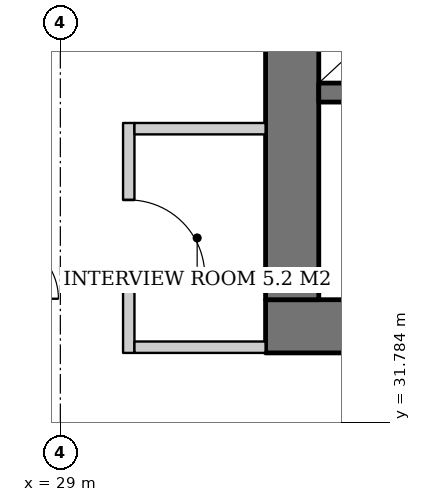
"""IFC4 building model, lengths in metres.
Left out: names, types, materials, properties, quantities, classifications, styles, units other than length and angle.
Written with IfcOpenShell. Run it as: python <this file> out.ifc"""

import sys

from ifc_helpers import new_model, si_unit, direction, frame, frame_2d, origin, place, context, subcontext, project, spatial, rectangle, extrude, element, fill, save


model = new_model("IFC4")
c1 = context("Model", 3, precision=1e-05, world=origin(), true_north=direction((0.0, 1.0)))
c2 = subcontext(c1, "Body", "Model", "MODEL_VIEW")
j1 = project(units=[si_unit("LENGTHUNIT", "METRE"), si_unit("PLANEANGLEUNIT", "RADIAN")], contexts=[c1])
p1 = place(None, origin())
s1 = spatial("IfcSite", under=j1, at=p1, CompositionType="ELEMENT")
p2 = place(p1, origin())
s2 = spatial("IfcBuilding", under=s1, at=p2, CompositionType="ELEMENT")
p3 = place(p2, frame((0.0, 0.0, 93.2)))
s3 = spatial("IfcBuildingStorey", under=s2, at=p3, CompositionType="ELEMENT", Elevation=93.2)
p4 = place(p3, frame((31.7, 33.05, 0.0), z_axis=(0.0, 0.0, 1.0), x_axis=(1.0, 0.0, 0.0)))
e1 = element("IfcWall", 1, at=p4, inside=s3, PredefinedType="SHEAR", context=c2, shape_type="SweptSolid", body=[
    extrude(rectangle(XDim=26.6, YDim=0.7, at=frame_2d((13.3, 0.0))), origin(), (0.0, 0.0, 1.0), 3.8),
])
p5 = place(p4, frame((7.3, 0.0, 0.0)))
e2 = element("IfcOpeningElement", 2, at=p5, cuts=e1, PredefinedType="OPENING", context=c2, shape_type="SweptSolid", body=[
    extrude(rectangle(XDim=1.0, YDim=2.1, at=frame_2d((0.5, 1.05))), frame((0.0, 0.36, 0.0), z_axis=(0.0, -1.0, 0.0), x_axis=(1.0, 0.0, 0.0)), (0.0, 0.0, 1.0), 0.72),
])
p6 = place(p4, frame((18.75, 0.0, 0.0)))
e3 = element("IfcOpeningElement", 3, at=p6, cuts=e1, PredefinedType="OPENING", context=c2, shape_type="SweptSolid", body=[
    extrude(rectangle(XDim=1.0, YDim=2.1, at=frame_2d((0.5, 1.05))), frame((0.0, 0.36, 0.0), z_axis=(0.0, -1.0, 0.0), x_axis=(1.0, 0.0, 0.0)), (0.0, 0.0, 1.0), 0.72),
])
p7 = place(p4, frame((1.85, 0.0, 0.0)))
e4 = element("IfcOpeningElement", 4, at=p7, cuts=e1, PredefinedType="OPENING", context=c2, shape_type="SweptSolid", body=[
    extrude(rectangle(XDim=1.0, YDim=2.1, at=frame_2d((0.5, 1.05))), frame((0.0, 0.36, 0.0), z_axis=(0.0, -1.0, 0.0), x_axis=(1.0, 0.0, 0.0)), (0.0, 0.0, 1.0), 0.72),
])
p8 = place(p4, frame((4.7, 0.0, 0.0)))
e5 = element("IfcOpeningElement", 5, at=p8, cuts=e1, PredefinedType="OPENING", context=c2, shape_type="SweptSolid", body=[
    extrude(rectangle(XDim=1.0, YDim=2.1, at=frame_2d((0.5, 1.05))), frame((0.0, 0.36, 0.0), z_axis=(0.0, -1.0, 0.0), x_axis=(1.0, 0.0, 0.0)), (0.0, 0.0, 1.0), 0.72),
])
p9 = place(p4, frame((12.44, 0.0, 0.0)))
e6 = element("IfcOpeningElement", 6, at=p9, cuts=e1, PredefinedType="OPENING", context=c2, shape_type="SweptSolid", body=[
    extrude(rectangle(XDim=1.0, YDim=2.1, at=frame_2d((0.5, 1.05))), frame((0.0, 0.36, 0.0), z_axis=(0.0, -1.0, 0.0), x_axis=(1.0, 0.0, 0.0)), (0.0, 0.0, 1.0), 0.72),
])
p10 = place(p4, frame((20.644, 0.0, 0.0)))
e7 = element("IfcOpeningElement", 7, at=p10, cuts=e1, PredefinedType="OPENING", context=c2, shape_type="SweptSolid", body=[
    extrude(rectangle(XDim=1.0, YDim=2.1, at=frame_2d((0.5, 1.05))), frame((0.0, 0.36, 0.0), z_axis=(0.0, -1.0, 0.0), x_axis=(1.0, 0.0, 0.0)), (0.0, 0.0, 1.0), 0.72),
])
p11 = place(p4, frame((23.544, 0.0, 0.0)))
e8 = element("IfcOpeningElement", 8, at=p11, cuts=e1, PredefinedType="OPENING", context=c2, shape_type="SweptSolid", body=[
    extrude(rectangle(XDim=1.0, YDim=2.1, at=frame_2d((0.5, 1.05))), frame((0.0, 0.36, 0.0), z_axis=(0.0, -1.0, 0.0), x_axis=(1.0, 0.0, 0.0)), (0.0, 0.0, 1.0), 0.72),
])
p12 = place(p3, frame((32.05, 33.4, 0.0), z_axis=(0.0, 0.0, 1.0), x_axis=(0.0, 1.0, 0.0)))
e9 = element("IfcWall", 9, at=p12, inside=s3, PredefinedType="SHEAR", context=c2, shape_type="SweptSolid", body=[
    extrude(rectangle(XDim=25.2, YDim=0.7, at=frame_2d((12.6, 0.0))), origin(), (0.0, 0.0, 1.0), 3.8),
])
p13 = place(p12, frame((3.45, 0.0, 0.0)))
e10 = element("IfcOpeningElement", 10, at=p13, cuts=e9, PredefinedType="OPENING", context=c2, shape_type="SweptSolid", body=[
    extrude(rectangle(XDim=1.3, YDim=2.2, at=frame_2d((0.65, 1.1))), frame((0.0, 0.36, 0.0), z_axis=(0.0, -1.0, 0.0), x_axis=(1.0, 0.0, 0.0)), (0.0, 0.0, 1.0), 0.72),
])
p14 = place(p12, frame((6.2, 0.0, 0.0)))
e11 = element("IfcOpeningElement", 11, at=p14, cuts=e9, PredefinedType="OPENING", context=c2, shape_type="SweptSolid", body=[
    extrude(rectangle(XDim=1.3, YDim=2.2, at=frame_2d((0.65, 1.1))), frame((0.0, 0.36, 0.0), z_axis=(0.0, -1.0, 0.0), x_axis=(1.0, 0.0, 0.0)), (0.0, 0.0, 1.0), 0.72),
])
p15 = place(p12, frame((8.95, 0.0, 0.0)))
e12 = element("IfcOpeningElement", 12, at=p15, cuts=e9, PredefinedType="OPENING", context=c2, shape_type="SweptSolid", body=[
    extrude(rectangle(XDim=1.3, YDim=2.2, at=frame_2d((0.65, 1.1))), frame((0.0, 0.36, 0.0), z_axis=(0.0, -1.0, 0.0), x_axis=(1.0, 0.0, 0.0)), (0.0, 0.0, 1.0), 0.72),
])
p16 = place(p12, frame((14.95, 0.0, 0.0)))
e13 = element("IfcOpeningElement", 13, at=p16, cuts=e9, PredefinedType="OPENING", context=c2, shape_type="SweptSolid", body=[
    extrude(rectangle(XDim=1.3, YDim=2.2, at=frame_2d((0.65, 1.1))), frame((0.0, 0.36, 0.0), z_axis=(0.0, -1.0, 0.0), x_axis=(1.0, 0.0, 0.0)), (0.0, 0.0, 1.0), 0.72),
])
p17 = place(p12, frame((17.7, 0.0, 0.0)))
e14 = element("IfcOpeningElement", 14, at=p17, cuts=e9, PredefinedType="OPENING", context=c2, shape_type="SweptSolid", body=[
    extrude(rectangle(XDim=1.3, YDim=2.2, at=frame_2d((0.65, 1.1))), frame((0.0, 0.36, 0.0), z_axis=(0.0, -1.0, 0.0), x_axis=(1.0, 0.0, 0.0)), (0.0, 0.0, 1.0), 0.72),
])
p18 = place(p12, frame((11.7, 0.0, 0.0)))
e15 = element("IfcOpeningElement", 15, at=p18, cuts=e9, PredefinedType="OPENING", context=c2, shape_type="SweptSolid", body=[
    extrude(rectangle(XDim=1.8, YDim=2.4, at=frame_2d((0.9, 1.2))), frame((0.0, 0.36, 0.0), z_axis=(0.0, -1.0, 0.0), x_axis=(1.0, 0.0, 0.0)), (0.0, 0.0, 1.0), 0.72),
])
p19 = place(p3, frame((32.4, 36.125, 0.0), z_axis=(0.0, 0.0, 1.0), x_axis=(1.0, 0.0, 0.0)))
e16 = element("IfcWall", 16, at=p19, inside=s3, PredefinedType="SHEAR", context=c2, shape_type="SweptSolid", body=[
    extrude(rectangle(XDim=2.7, YDim=0.25, at=frame_2d((1.35, 0.0))), origin(), (0.0, 0.0, 1.0), 3.8),
])
p20 = place(p3, frame((29.9, 35.725, 0.0), z_axis=(0.0, 0.0, 1.0), x_axis=(0.0, -1.0, 0.0)))
e17 = element("IfcWall", 17, at=p20, inside=s3, PredefinedType="PARTITIONING", context=c2, shape_type="SweptSolid", body=[
    extrude(rectangle(XDim=3.025, YDim=0.15, at=frame_2d((1.513, 0.0))), origin(), (0.0, 0.0, 1.0), 3.62),
])
p21 = place(p20, frame((1.012, 0.0, 0.0)))
e18 = element("IfcOpeningElement", 18, at=p21, cuts=e17, PredefinedType="OPENING", context=c2, shape_type="SweptSolid", body=[
    extrude(rectangle(XDim=1.0, YDim=2.1, at=frame_2d((0.5, 1.05))), frame((0.0, 0.085, 0.0), z_axis=(0.0, -1.0, 0.0), x_axis=(1.0, 0.0, 0.0)), (0.0, 0.0, 1.0), 0.17),
])
for number, where, z_axis, x_axis in (
    (19, (31.7, 35.65, 0.0), (0.0, 0.0, 1.0), (-1.0, 0.0, 0.0)),
    (20, (31.7, 32.775, 0.0), (0.0, 0.0, 1.0), (-1.0, 0.0, 0.0)),
):
    element("IfcWall", number, at=place(p3, frame(where, z_axis=z_axis, x_axis=x_axis)), inside=s3, PredefinedType="PARTITIONING", context=c2, shape_type="SweptSolid", body=[
        extrude(rectangle(XDim=1.725, YDim=0.15, at=frame_2d((0.862, 0.0))), origin(), (0.0, 0.0, 1.0), 3.62),
    ])
p22 = place(p21, origin())
e21 = element("IfcDoor", 21, at=p22, inside=s3, OperationType="SINGLE_SWING_RIGHT", PredefinedType="DOOR", context=c2, shape_type="SweptSolid", body=[
    extrude(rectangle(XDim=1.0, YDim=2.1, at=frame_2d((0.5, 1.05))), frame((0.0, 0.025, 0.0), z_axis=(0.0, -1.0, 0.0), x_axis=(1.0, 0.0, 0.0)), (0.0, 0.0, 1.0), 0.05),
])
fill(e18, e21)
save(model, sys.argv[1])
